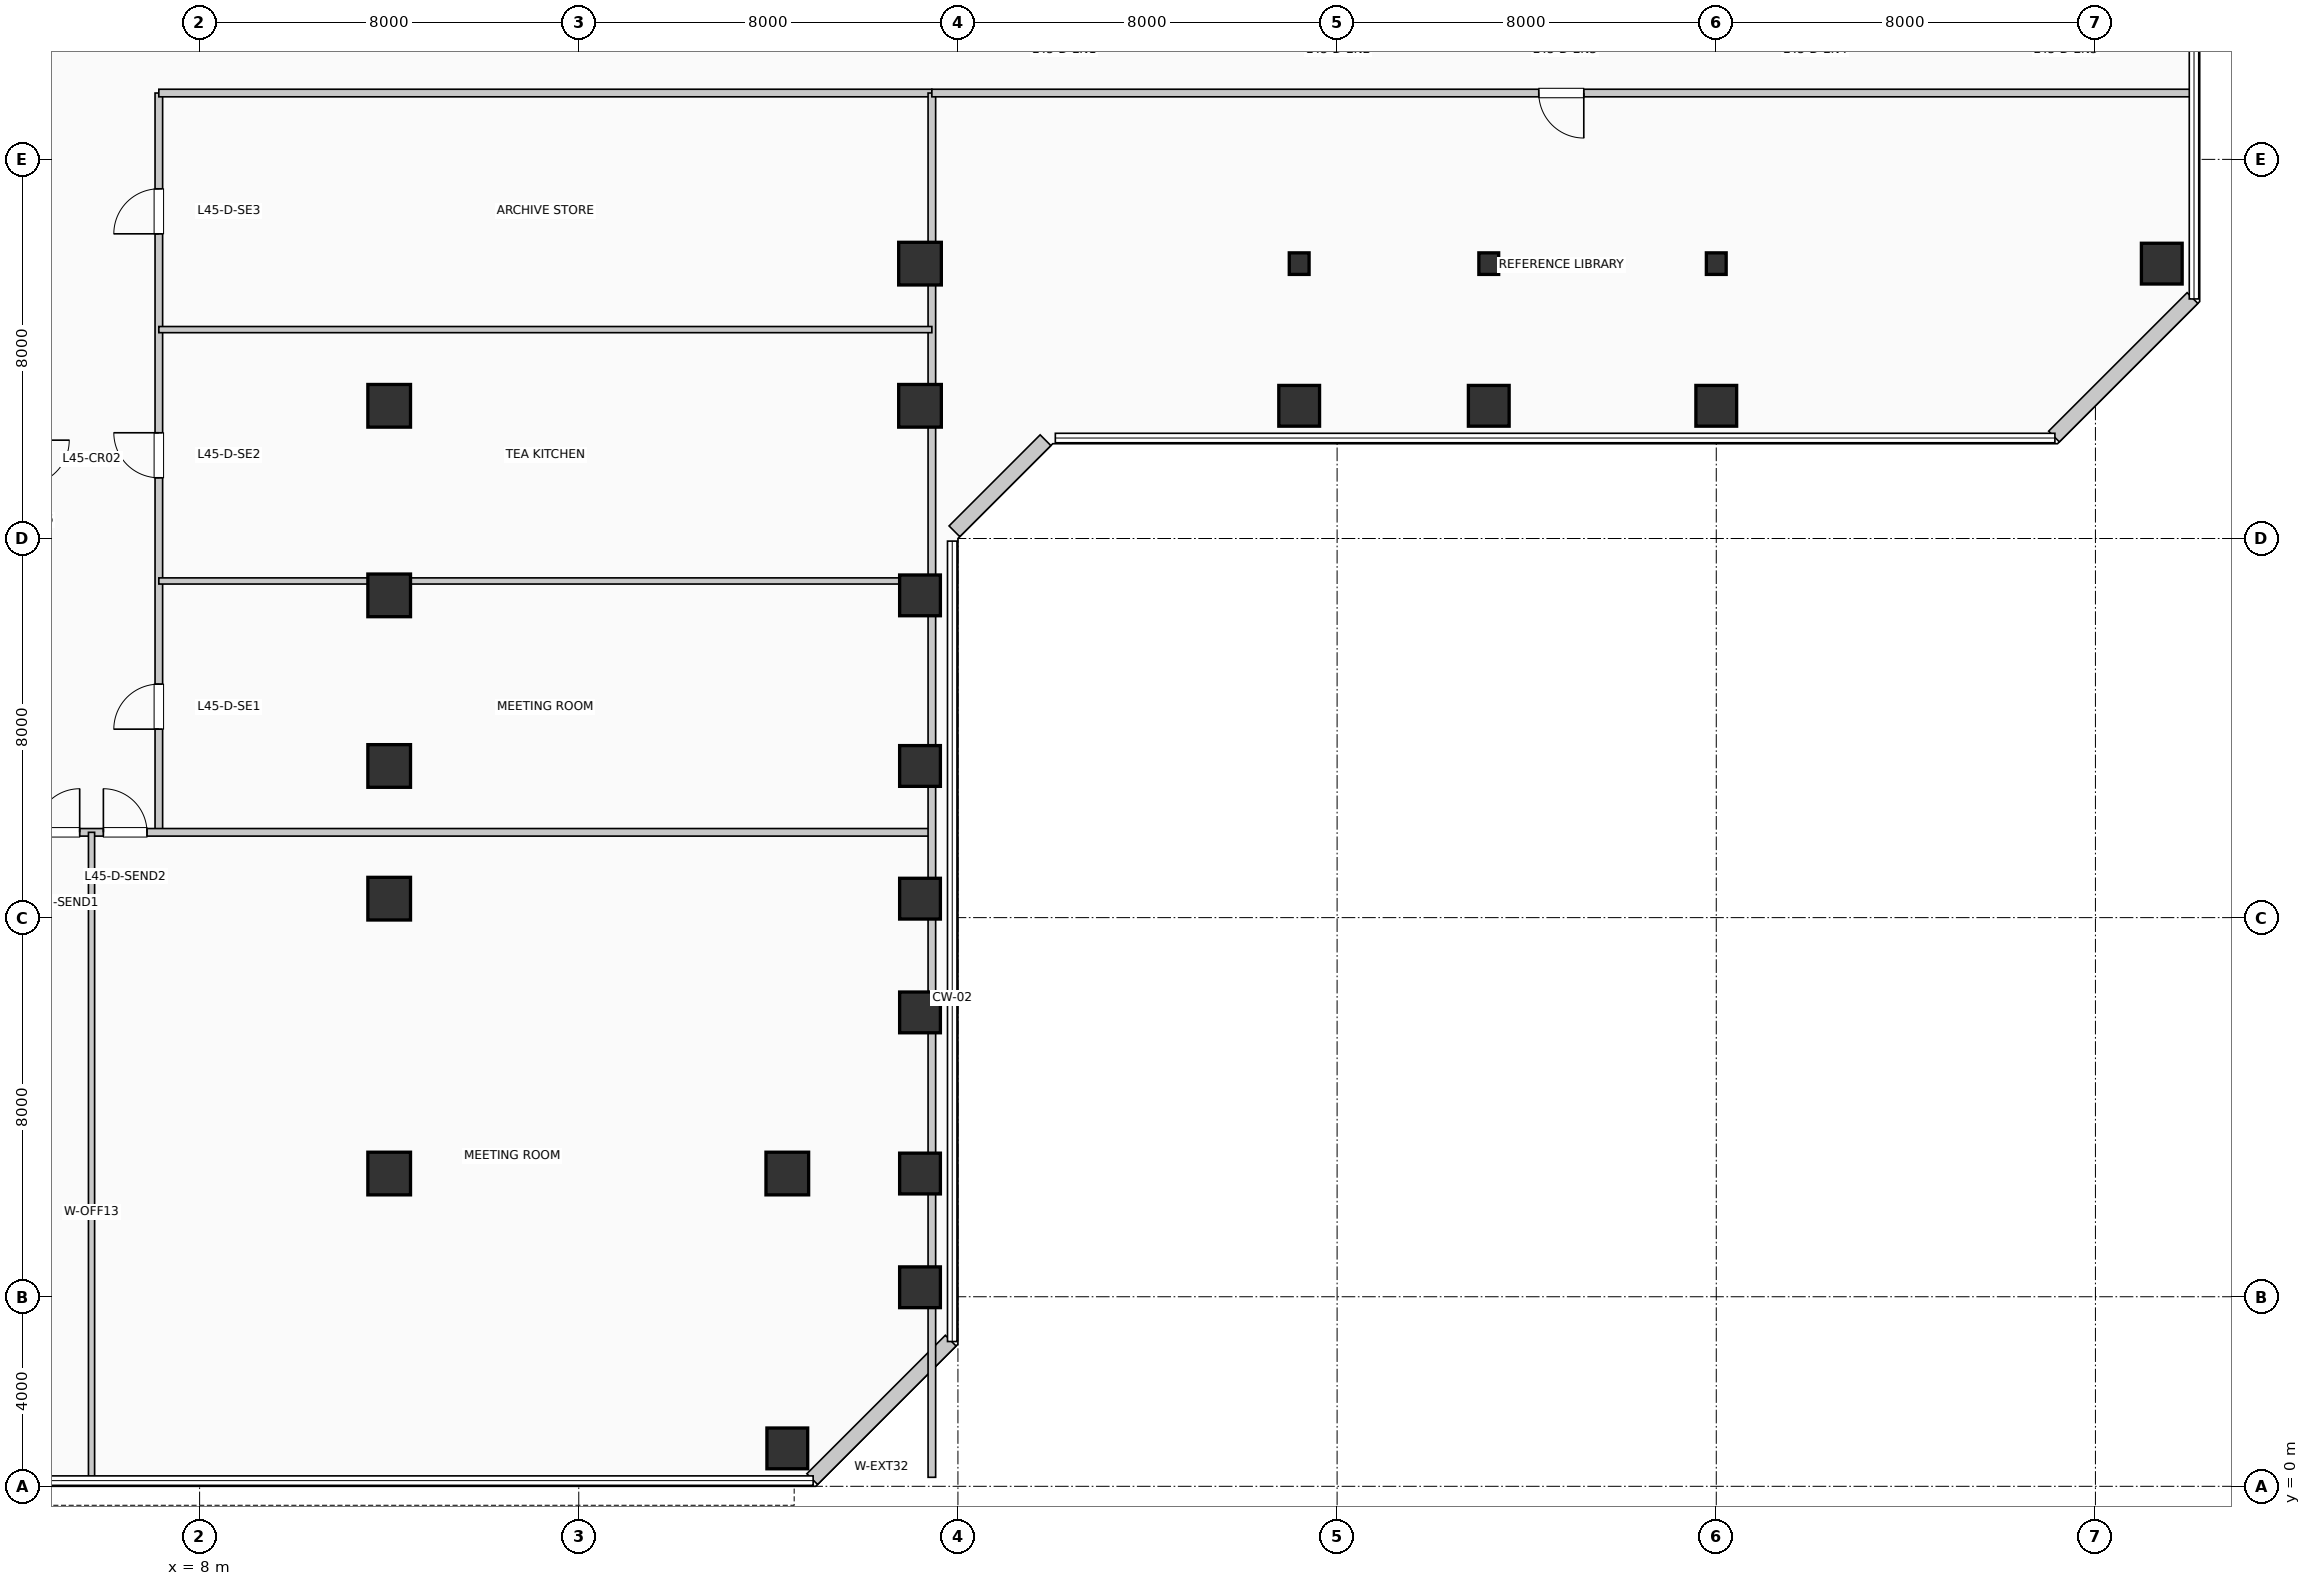
"""IFC4 building model, lengths in metres.
Left out: names, types, materials, properties, quantities, classifications, styles, units other than length and angle.
Written with IfcOpenShell. Run it as: python <this file> out.ifc"""

import sys

from ifc_helpers import new_model, si_unit, direction, frame, frame_2d, origin, origin_2d, place, context, subcontext, project, spatial, rectangle, i_section, extrude, element, fill, save


model = new_model("IFC4")
c1 = context("Model", 3, precision=1e-05, world=origin(), true_north=direction((0.0, 1.0)))
c2 = subcontext(c1, "Body", "Model", "MODEL_VIEW")
j1 = project(units=[si_unit("LENGTHUNIT", "METRE"), si_unit("PLANEANGLEUNIT", "RADIAN")], contexts=[c1])
p1 = place(None, origin())
s1 = spatial("IfcSite", under=j1, at=p1, CompositionType="ELEMENT")
p2 = place(p1, origin())
s2 = spatial("IfcBuilding", under=s1, at=p2, CompositionType="ELEMENT")
p3 = place(p2, frame((0.0, 0.0, 187.44)))
s3 = spatial("IfcBuildingStorey", under=s2, at=p3, CompositionType="ELEMENT", Elevation=187.44)
for number, where, z_axis, x_axis in (
    (1, (12.0, 6.6, 0.0), (0.0, 0.0, 1.0), (1.0, 0.0, 0.0)),
    (2, (12.0, 12.4, 0.0), (0.0, 0.0, 1.0), (1.0, 0.0, 0.0)),
    (3, (12.0, 15.2, 0.0), (0.0, 0.0, 1.0), (1.0, 0.0, 0.0)),
    (4, (12.0, 18.8, 0.0), (0.0, 0.0, 1.0), (1.0, 0.0, 0.0)),
    (5, (12.0, 22.8, 0.0), (0.0, 0.0, 1.0), (1.0, 0.0, 0.0)),
):
    element("IfcColumn", number, at=place(p3, frame(where, z_axis=z_axis, x_axis=x_axis)), inside=s3, PredefinedType="COLUMN", context=c2, shape_type="SweptSolid", body=[
        extrude(rectangle(XDim=0.9, YDim=0.9, at=origin_2d()), origin(), (0.0, 0.0, 1.0), 3.96),
    ])
p4 = place(p3, frame((20.4, 0.8, 0.0), z_axis=(0.0, 0.0, 1.0), x_axis=(1.0, 0.0, 0.0)))
e6 = element("IfcColumn", 6, at=p4, inside=s3, PredefinedType="COLUMN", context=c2, shape_type="SweptSolid", body=[
    extrude(rectangle(XDim=0.86, YDim=0.86, at=origin_2d()), origin(), (0.0, 0.0, 1.0), 3.96),
])
p5 = place(p3, frame((20.4, 6.6, 0.0), z_axis=(0.0, 0.0, 1.0), x_axis=(1.0, 0.0, 0.0)))
e7 = element("IfcColumn", 7, at=p5, inside=s3, PredefinedType="COLUMN", context=c2, shape_type="SweptSolid", body=[
    extrude(rectangle(XDim=0.9, YDim=0.9, at=origin_2d()), origin(), (0.0, 0.0, 1.0), 3.96),
])
for number, where, z_axis, x_axis in (
    (8, (23.2, 4.2, 0.0), (0.0, 0.0, 1.0), (1.0, 0.0, 0.0)),
    (9, (23.2, 6.6, 0.0), (0.0, 0.0, 1.0), (1.0, 0.0, 0.0)),
    (10, (23.2, 10.0, 0.0), (0.0, 0.0, 1.0), (1.0, 0.0, 0.0)),
    (11, (23.2, 12.4, 0.0), (0.0, 0.0, 1.0), (1.0, 0.0, 0.0)),
    (12, (23.2, 15.2, 0.0), (0.0, 0.0, 1.0), (1.0, 0.0, 0.0)),
    (13, (23.2, 18.8, 0.0), (0.0, 0.0, 1.0), (1.0, 0.0, 0.0)),
):
    element("IfcColumn", number, at=place(p3, frame(where, z_axis=z_axis, x_axis=x_axis)), inside=s3, PredefinedType="COLUMN", context=c2, shape_type="SweptSolid", body=[
        extrude(rectangle(XDim=0.86, YDim=0.86, at=origin_2d()), origin(), (0.0, 0.0, 1.0), 3.96),
    ])
for number, where, z_axis, x_axis in (
    (14, (23.2, 22.8, 0.0), (0.0, 0.0, 1.0), (1.0, 0.0, 0.0)),
    (15, (23.2, 25.8, 0.0), (0.0, 0.0, 1.0), (1.0, 0.0, 0.0)),
):
    element("IfcColumn", number, at=place(p3, frame(where, z_axis=z_axis, x_axis=x_axis)), inside=s3, PredefinedType="COLUMN", context=c2, shape_type="SweptSolid", body=[
        extrude(rectangle(XDim=0.9, YDim=0.9, at=origin_2d()), origin(), (0.0, 0.0, 1.0), 3.96),
    ])
p6 = place(p3, frame((31.2, 22.8, 0.0), z_axis=(0.0, 0.0, 1.0), x_axis=(1.0, 0.0, 0.0)))
e16 = element("IfcColumn", 16, at=p6, inside=s3, PredefinedType="COLUMN", context=c2, shape_type="SweptSolid", body=[
    extrude(rectangle(XDim=0.86, YDim=0.86, at=origin_2d()), origin(), (0.0, 0.0, 1.0), 3.96),
])
p7 = place(p3, frame((31.2, 25.8, 0.0), z_axis=(0.0, 0.0, 1.0), x_axis=(1.0, 0.0, 0.0)))
e17 = element("IfcColumn", 17, at=p7, inside=s3, PredefinedType="COLUMN", context=c2, shape_type="SweptSolid", body=[
    extrude(i_section(OverallWidth=0.418, OverallDepth=0.455, WebThickness=0.032, FlangeThickness=0.051, at=origin_2d()), origin(), (0.0, 0.0, 1.0), 3.96),
])
p8 = place(p3, frame((35.2, 22.8, 0.0), z_axis=(0.0, 0.0, 1.0), x_axis=(1.0, 0.0, 0.0)))
e18 = element("IfcColumn", 18, at=p8, inside=s3, PredefinedType="COLUMN", context=c2, shape_type="SweptSolid", body=[
    extrude(rectangle(XDim=0.86, YDim=0.86, at=origin_2d()), origin(), (0.0, 0.0, 1.0), 3.96),
])
p9 = place(p3, frame((35.2, 25.8, 0.0), z_axis=(0.0, 0.0, 1.0), x_axis=(1.0, 0.0, 0.0)))
e19 = element("IfcColumn", 19, at=p9, inside=s3, PredefinedType="COLUMN", context=c2, shape_type="SweptSolid", body=[
    extrude(i_section(OverallWidth=0.418, OverallDepth=0.455, WebThickness=0.032, FlangeThickness=0.051, at=origin_2d()), origin(), (0.0, 0.0, 1.0), 3.96),
])
p10 = place(p3, frame((40.0, 22.8, 0.0), z_axis=(0.0, 0.0, 1.0), x_axis=(1.0, 0.0, 0.0)))
e20 = element("IfcColumn", 20, at=p10, inside=s3, PredefinedType="COLUMN", context=c2, shape_type="SweptSolid", body=[
    extrude(rectangle(XDim=0.86, YDim=0.86, at=origin_2d()), origin(), (0.0, 0.0, 1.0), 3.96),
])
p11 = place(p3, frame((40.0, 25.8, 0.0), z_axis=(0.0, 0.0, 1.0), x_axis=(1.0, 0.0, 0.0)))
e21 = element("IfcColumn", 21, at=p11, inside=s3, PredefinedType="COLUMN", context=c2, shape_type="SweptSolid", body=[
    extrude(i_section(OverallWidth=0.418, OverallDepth=0.455, WebThickness=0.032, FlangeThickness=0.051, at=origin_2d()), origin(), (0.0, 0.0, 1.0), 3.96),
])
p12 = place(p3, frame((49.4, 25.8, 0.0), z_axis=(0.0, 0.0, 1.0), x_axis=(1.0, 0.0, 0.0)))
e22 = element("IfcColumn", 22, at=p12, inside=s3, PredefinedType="COLUMN", context=c2, shape_type="SweptSolid", body=[
    extrude(rectangle(XDim=0.86, YDim=0.86, at=origin_2d()), origin(), (0.0, 0.0, 1.0), 3.96),
])
p13 = place(p3, frame((20.926, 0.152, 0.0), z_axis=(0.0, 0.0, 1.0), x_axis=(0.707106781187, 0.707106781187, 0.0)))
e23 = element("IfcWall", 23, at=p13, inside=s3, PredefinedType="SOLIDWALL", context=c2, shape_type="SweptSolid", body=[
    extrude(rectangle(XDim=4.133, YDim=0.32, at=frame_2d((2.066, 0.0))), origin(), (0.0, 0.0, 1.0), 3.71),
])
p14 = place(p3, frame((23.926, 20.152, 0.0), z_axis=(0.0, 0.0, 1.0), x_axis=(0.707106781187, 0.707106781187, 0.0)))
e24 = element("IfcWall", 24, at=p14, inside=s3, PredefinedType="SOLIDWALL", context=c2, shape_type="SweptSolid", body=[
    extrude(rectangle(XDim=2.718, YDim=0.32, at=frame_2d((1.359, 0.0))), origin(), (0.0, 0.0, 1.0), 3.71),
])
p15 = place(p3, frame((47.126, 22.152, 0.0), z_axis=(0.0, 0.0, 1.0), x_axis=(0.707136318428, 0.707077242712, 0.0)))
e25 = element("IfcWall", 25, at=p15, inside=s3, PredefinedType="SOLIDWALL", context=c2, shape_type="SweptSolid", body=[
    extrude(rectangle(XDim=4.133, YDim=0.32, at=frame_2d((2.066, 0.0))), origin(), (0.0, 0.0, 1.0), 3.71),
])
p16 = place(p3, frame((7.14, 13.8, 0.0), z_axis=(0.0, 0.0, 1.0), x_axis=(0.0, 1.0, 0.0)))
e26 = element("IfcWall", 26, at=p16, inside=s3, PredefinedType="PARTITIONING", context=c2, shape_type="SweptSolid", body=[
    extrude(rectangle(XDim=15.6, YDim=0.16, at=frame_2d((7.8, 0.0))), origin(), (0.0, 0.0, 1.0), 3.71),
])
p17 = place(p16, frame((2.177, 0.0, 0.0)))
e27 = element("IfcOpeningElement", 27, at=p17, cuts=e26, PredefinedType="OPENING", context=c2, shape_type="SweptSolid", body=[
    extrude(rectangle(XDim=0.95, YDim=2.15, at=frame_2d((0.475, 1.075))), frame((0.0, 0.09, 0.0), z_axis=(0.0, -1.0, 0.0), x_axis=(1.0, 0.0, 0.0)), (0.0, 0.0, 1.0), 0.18),
])
p18 = place(p16, frame((7.481, 0.0, 0.0)))
e28 = element("IfcOpeningElement", 28, at=p18, cuts=e26, PredefinedType="OPENING", context=c2, shape_type="SweptSolid", body=[
    extrude(rectangle(XDim=0.95, YDim=2.15, at=frame_2d((0.475, 1.075))), frame((0.0, 0.09, 0.0), z_axis=(0.0, -1.0, 0.0), x_axis=(1.0, 0.0, 0.0)), (0.0, 0.0, 1.0), 0.18),
])
p19 = place(p16, frame((12.629, 0.0, 0.0)))
e29 = element("IfcOpeningElement", 29, at=p19, cuts=e26, PredefinedType="OPENING", context=c2, shape_type="SweptSolid", body=[
    extrude(rectangle(XDim=0.95, YDim=2.15, at=frame_2d((0.475, 1.075))), frame((0.0, 0.09, 0.0), z_axis=(0.0, -1.0, 0.0), x_axis=(1.0, 0.0, 0.0)), (0.0, 0.0, 1.0), 0.18),
])
p20 = place(p3, frame((0.19, 13.8, 0.0), z_axis=(0.0, 0.0, 1.0), x_axis=(1.0, 0.0, 0.0)))
e30 = element("IfcWall", 30, at=p20, inside=s3, PredefinedType="PARTITIONING", context=c2, shape_type="SweptSolid", body=[
    extrude(rectangle(XDim=23.26, YDim=0.16, at=frame_2d((11.63, 0.0))), origin(), (0.0, 0.0, 1.0), 3.71),
])
p21 = place(p20, frame((4.36, 0.0, 0.0)))
e31 = element("IfcOpeningElement", 31, at=p21, cuts=e30, PredefinedType="OPENING", context=c2, shape_type="SweptSolid", body=[
    extrude(rectangle(XDim=0.92, YDim=2.1, at=frame_2d((0.46, 1.05))), frame((0.0, 0.09, 0.0), z_axis=(0.0, -1.0, 0.0), x_axis=(1.0, 0.0, 0.0)), (0.0, 0.0, 1.0), 0.18),
])
p22 = place(p20, frame((5.78, 0.0, 0.0)))
e32 = element("IfcOpeningElement", 32, at=p22, cuts=e30, PredefinedType="OPENING", context=c2, shape_type="SweptSolid", body=[
    extrude(rectangle(XDim=0.92, YDim=2.1, at=frame_2d((0.46, 1.05))), frame((0.0, 0.09, 0.0), z_axis=(0.0, -1.0, 0.0), x_axis=(1.0, 0.0, 0.0)), (0.0, 0.0, 1.0), 0.18),
])
p23 = place(p3, frame((7.14, 29.4, 0.0), z_axis=(0.0, 0.0, 1.0), x_axis=(1.0, 0.0, 0.0)))
e33 = element("IfcWall", 33, at=p23, inside=s3, PredefinedType="PARTITIONING", context=c2, shape_type="SweptSolid", body=[
    extrude(rectangle(XDim=16.31, YDim=0.16, at=frame_2d((8.155, 0.0))), origin(), (0.0, 0.0, 1.0), 3.365),
])
p24 = place(p3, frame((23.45, 0.19, 0.0), z_axis=(0.0, 0.0, 1.0), x_axis=(0.0, 1.0, 0.0)))
e34 = element("IfcWall", 34, at=p24, inside=s3, PredefinedType="PARTITIONING", context=c2, shape_type="SweptSolid", body=[
    extrude(rectangle(XDim=29.21, YDim=0.16, at=frame_2d((14.605, 0.0))), origin(), (0.0, 0.0, 1.0), 3.045),
])
p25 = place(p3, frame((5.72, 0.19, 0.0), z_axis=(0.0, 0.0, 1.0), x_axis=(0.0, 1.0, 0.0)))
e35 = element("IfcWall", 35, at=p25, inside=s3, PredefinedType="PARTITIONING", context=c2, shape_type="SweptSolid", body=[
    extrude(rectangle(XDim=13.61, YDim=0.13, at=frame_2d((6.805, 0.0))), origin(), (0.0, 0.0, 1.0), 3.71),
])
p26 = place(p3, frame((7.14, 19.104, 0.0), z_axis=(0.0, 0.0, 1.0), x_axis=(1.0, 0.0, 0.0)))
e36 = element("IfcWall", 36, at=p26, inside=s3, PredefinedType="PARTITIONING", context=c2, shape_type="SweptSolid", body=[
    extrude(rectangle(XDim=16.31, YDim=0.13, at=frame_2d((8.155, 0.0))), origin(), (0.0, 0.0, 1.0), 3.045),
])
p27 = place(p3, frame((7.14, 24.408, 0.0), z_axis=(0.0, 0.0, 1.0), x_axis=(1.0, 0.0, 0.0)))
e37 = element("IfcWall", 37, at=p27, inside=s3, PredefinedType="PARTITIONING", context=c2, shape_type="SweptSolid", body=[
    extrude(rectangle(XDim=16.31, YDim=0.13, at=frame_2d((8.155, 0.0))), origin(), (0.0, 0.0, 1.0), 3.71),
])
p28 = place(p3, frame((23.45, 29.4, 0.0), z_axis=(0.0, 0.0, 1.0), x_axis=(1.0, 0.0, 0.0)))
e38 = element("IfcWall", 38, at=p28, inside=s3, PredefinedType="PARTITIONING", context=c2, shape_type="SweptSolid", body=[
    extrude(rectangle(XDim=26.56, YDim=0.16, at=frame_2d((13.28, 0.0))), origin(), (0.0, 0.0, 1.0), 3.365),
])
p29 = place(p28, frame((13.755, 0.0, 0.0), z_axis=(0.0, 0.0, 1.0), x_axis=(-1.0, 0.0, 0.0)))
e39 = element("IfcOpeningElement", 39, at=p29, cuts=e38, PredefinedType="OPENING", context=c2, shape_type="SweptSolid", body=[
    extrude(rectangle(XDim=0.95, YDim=2.15, at=frame_2d((0.475, 1.075))), frame((0.0, 0.09, 0.0), z_axis=(0.0, -1.0, 0.0), x_axis=(1.0, 0.0, 0.0)), (0.0, 0.0, 1.0), 0.18),
])
p30 = place(p21, origin())
e40 = element("IfcDoor", 40, at=p30, inside=s3, OperationType="SINGLE_SWING_RIGHT", PredefinedType="DOOR", context=c2, shape_type="SweptSolid", body=[
    extrude(rectangle(XDim=0.92, YDim=2.1, at=frame_2d((0.46, 1.05))), frame((0.0, 0.025, 0.0), z_axis=(0.0, -1.0, 0.0), x_axis=(1.0, 0.0, 0.0)), (0.0, 0.0, 1.0), 0.05),
])
fill(e31, e40)
p31 = place(p22, origin())
e41 = element("IfcDoor", 41, at=p31, inside=s3, OperationType="SINGLE_SWING_LEFT", PredefinedType="DOOR", context=c2, shape_type="SweptSolid", body=[
    extrude(rectangle(XDim=0.92, YDim=2.1, at=frame_2d((0.46, 1.05))), frame((0.0, 0.025, 0.0), z_axis=(0.0, -1.0, 0.0), x_axis=(1.0, 0.0, 0.0)), (0.0, 0.0, 1.0), 0.05),
])
fill(e32, e41)
p32 = place(p17, origin())
e42 = element("IfcDoor", 42, at=p32, inside=s3, OperationType="SINGLE_SWING_LEFT", PredefinedType="DOOR", context=c2, shape_type="SweptSolid", body=[
    extrude(rectangle(XDim=0.95, YDim=2.15, at=frame_2d((0.475, 1.075))), frame((0.0, 0.025, 0.0), z_axis=(0.0, -1.0, 0.0), x_axis=(1.0, 0.0, 0.0)), (0.0, 0.0, 1.0), 0.05),
])
fill(e27, e42)
p33 = place(p18, origin())
e43 = element("IfcDoor", 43, at=p33, inside=s3, OperationType="SINGLE_SWING_RIGHT", PredefinedType="DOOR", context=c2, shape_type="SweptSolid", body=[
    extrude(rectangle(XDim=0.95, YDim=2.15, at=frame_2d((0.475, 1.075))), frame((0.0, 0.025, 0.0), z_axis=(0.0, -1.0, 0.0), x_axis=(1.0, 0.0, 0.0)), (0.0, 0.0, 1.0), 0.05),
])
fill(e28, e43)
p34 = place(p19, origin())
e44 = element("IfcDoor", 44, at=p34, inside=s3, OperationType="SINGLE_SWING_LEFT", PredefinedType="DOOR", context=c2, shape_type="SweptSolid", body=[
    extrude(rectangle(XDim=0.95, YDim=2.15, at=frame_2d((0.475, 1.075))), frame((0.0, 0.025, 0.0), z_axis=(0.0, -1.0, 0.0), x_axis=(1.0, 0.0, 0.0)), (0.0, 0.0, 1.0), 0.05),
])
fill(e29, e44)
p35 = place(p29, origin())
e45 = element("IfcDoor", 45, at=p35, inside=s3, OperationType="SINGLE_SWING_RIGHT", PredefinedType="DOOR", context=c2, shape_type="SweptSolid", body=[
    extrude(rectangle(XDim=0.95, YDim=2.15, at=frame_2d((0.475, 1.075))), frame((0.0, 0.025, 0.0), z_axis=(0.0, -1.0, 0.0), x_axis=(1.0, 0.0, 0.0)), (0.0, 0.0, 1.0), 0.05),
])
fill(e39, e45)
save(model, sys.argv[1])
